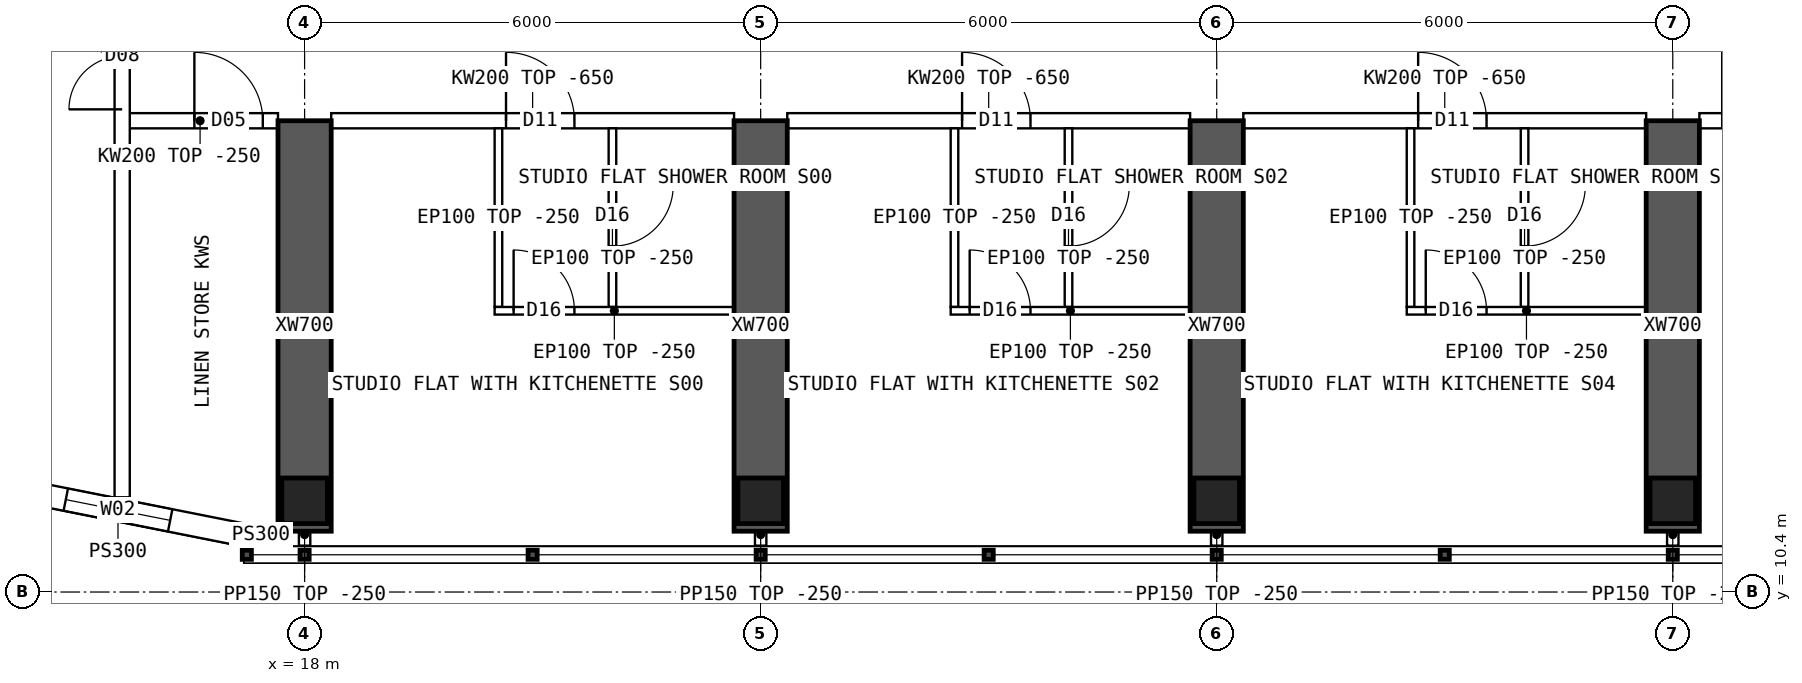
"""IFC4 building model, lengths in metres.
Left out: names, types, materials, properties, quantities, classifications, styles, units other than length and angle.
Written with IfcOpenShell. Run it as: python <this file> out.ifc"""

import sys

from ifc_helpers import new_model, si_unit, direction, frame, frame_2d, origin, origin_2d, place, context, subcontext, project, spatial, polyline, rectangle, hollow_rectangle, outline, extrude, element, fill, save


model = new_model("IFC4")
c1 = context("Model", 3, precision=1e-05, world=origin(), true_north=direction((0.0, 1.0)))
c2 = subcontext(c1, "Body", "Model", "MODEL_VIEW")
j1 = project(units=[si_unit("LENGTHUNIT", "METRE"), si_unit("PLANEANGLEUNIT", "RADIAN")], contexts=[c1])
p1 = place(None, origin())
s1 = spatial("IfcSite", under=j1, at=p1, CompositionType="ELEMENT")
p2 = place(p1, origin())
s2 = spatial("IfcBuilding", under=s1, at=p2, CompositionType="ELEMENT")
p3 = place(p2, frame((0.0, 0.0, 250.3)))
s3 = spatial("IfcBuildingStorey", under=s2, at=p3, CompositionType="ELEMENT", Elevation=250.3)
for number, where, z_axis, x_axis in (
    (1, (18.0, 11.6, 0.0), (0.0, 0.0, 1.0), (1.0, 0.0, 0.0)),
    (2, (24.0, 11.6, 0.0), (0.0, 0.0, 1.0), (1.0, 0.0, 0.0)),
    (3, (30.0, 11.6, 0.0), (0.0, 0.0, 1.0), (1.0, 0.0, 0.0)),
    (4, (36.0, 11.6, 0.0), (0.0, 0.0, 1.0), (1.0, 0.0, 0.0)),
):
    element("IfcColumn", number, at=place(p3, frame(where, z_axis=z_axis, x_axis=x_axis)), inside=s3, PredefinedType="COLUMN", context=c2, shape_type="SweptSolid", body=[
        extrude(hollow_rectangle(XDim=0.6, YDim=0.6, WallThickness=0.06, at=origin_2d()), origin(), (0.0, 0.0, 1.0), 3.75),
    ])
for number, where, z_axis, x_axis in (
    (5, (18.0, 11.2, 0.0), (0.0, 0.0, 1.0), (0.0, 1.0, 0.0)),
    (6, (24.0, 11.2, 0.0), (0.0, 0.0, 1.0), (0.0, 1.0, 0.0)),
    (7, (30.0, 11.2, 0.0), (0.0, 0.0, 1.0), (0.0, 1.0, 0.0)),
    (8, (36.0, 11.2, 0.0), (0.0, 0.0, 1.0), (0.0, 1.0, 0.0)),
):
    element("IfcWall", number, at=place(p3, frame(where, z_axis=z_axis, x_axis=x_axis)), inside=s3, PredefinedType="SHEAR", context=c2, shape_type="SweptSolid", body=[
        extrude(rectangle(XDim=5.4, YDim=0.7, at=frame_2d((2.7, 0.0))), origin(), (0.0, 0.0, 1.0), 3.75),
    ])
p4 = place(p3, frame((13.89, 11.808, 0.0), z_axis=(0.0, 0.0, 1.0), x_axis=(0.98078325777, -0.195100490205, 0.0)))
e9 = element("IfcWall", 9, at=p4, inside=s3, PredefinedType="SOLIDWALL", context=c2, shape_type="SweptSolid", body=[
    extrude(outline(polyline([(-0.03, -0.15), (3.405, -0.15), (3.345, 0.15), (0.03, 0.15), (-0.03, -0.15)])), origin(), (0.0, 0.0, 1.0), 3.5),
])
p5 = place(p4, frame((0.988, 0.0, 0.9)))
e10 = element("IfcOpeningElement", 10, at=p5, cuts=e9, PredefinedType="OPENING", context=c2, shape_type="SweptSolid", body=[
    extrude(rectangle(XDim=1.4, YDim=1.8, at=frame_2d((0.7, 0.9))), frame((0.0, 0.16, 0.0), z_axis=(0.0, -1.0, 0.0), x_axis=(1.0, 0.0, 0.0)), (0.0, 0.0, 1.0), 0.32),
])
p6 = place(p3, frame((17.2, 11.15, 0.0), z_axis=(0.0, 0.0, 1.0), x_axis=(1.0, 0.0, 0.0)))
e11 = element("IfcWall", 11, at=p6, inside=s3, PredefinedType="SOLIDWALL", context=c2, shape_type="SweptSolid", body=[
    extrude(rectangle(XDim=0.45, YDim=0.3, at=frame_2d((0.225, 0.0))), origin(), (0.0, 0.0, 1.0), 3.5),
])
p7 = place(p3, frame((15.6, 16.6, 0.0), z_axis=(0.0, 0.0, 1.0), x_axis=(1.0, 0.0, 0.0)))
e12 = element("IfcWall", 12, at=p7, inside=s3, PredefinedType="SOLIDWALL", context=c2, shape_type="SweptSolid", body=[
    extrude(rectangle(XDim=2.05, YDim=0.2, at=frame_2d((1.025, 0.0))), origin(), (0.0, 0.0, 1.0), 3.5),
])
p8 = place(p7, frame((0.95, 0.0, 0.0)))
e13 = element("IfcOpeningElement", 13, at=p8, cuts=e12, PredefinedType="OPENING", context=c2, shape_type="SweptSolid", body=[
    extrude(rectangle(XDim=0.9, YDim=2.1, at=frame_2d((0.45, 1.05))), frame((0.0, 0.11, 0.0), z_axis=(0.0, -1.0, 0.0), x_axis=(1.0, 0.0, 0.0)), (0.0, 0.0, 1.0), 0.22),
])
p9 = place(p3, frame((18.35, 16.6, 0.0), z_axis=(0.0, 0.0, 1.0), x_axis=(1.0, 0.0, 0.0)))
e14 = element("IfcWall", 14, at=p9, inside=s3, PredefinedType="SOLIDWALL", context=c2, shape_type="SweptSolid", body=[
    extrude(outline(polyline([(0.0, 0.0), (5.3, 0.0), (5.3, 3.1), (0.0, 3.1), (0.0, 0.0)])), frame((0.0, 0.1, 0.0), z_axis=(0.0, -1.0, 0.0), x_axis=(1.0, 0.0, 0.0)), (0.0, 0.0, 1.0), 0.2),
])
p10 = place(p9, frame((2.3, 0.0, 0.0)))
e15 = element("IfcOpeningElement", 15, at=p10, cuts=e14, PredefinedType="OPENING", context=c2, shape_type="SweptSolid", body=[
    extrude(rectangle(XDim=0.9, YDim=2.1, at=frame_2d((0.45, 1.05))), frame((0.0, 0.11, 0.0), z_axis=(0.0, -1.0, 0.0), x_axis=(1.0, 0.0, 0.0)), (0.0, 0.0, 1.0), 0.22),
])
p11 = place(p3, frame((24.35, 16.6, 0.0), z_axis=(0.0, 0.0, 1.0), x_axis=(1.0, 0.0, 0.0)))
e16 = element("IfcWall", 16, at=p11, inside=s3, PredefinedType="SOLIDWALL", context=c2, shape_type="SweptSolid", body=[
    extrude(outline(polyline([(0.0, 0.0), (5.3, 0.0), (5.3, 3.1), (0.0, 3.1), (0.0, 0.0)])), frame((0.0, 0.1, 0.0), z_axis=(0.0, -1.0, 0.0), x_axis=(1.0, 0.0, 0.0)), (0.0, 0.0, 1.0), 0.2),
])
p12 = place(p11, frame((2.3, 0.0, 0.0)))
e17 = element("IfcOpeningElement", 17, at=p12, cuts=e16, PredefinedType="OPENING", context=c2, shape_type="SweptSolid", body=[
    extrude(rectangle(XDim=0.9, YDim=2.1, at=frame_2d((0.45, 1.05))), frame((0.0, 0.11, 0.0), z_axis=(0.0, -1.0, 0.0), x_axis=(1.0, 0.0, 0.0)), (0.0, 0.0, 1.0), 0.22),
])
p13 = place(p3, frame((30.35, 16.6, 0.0), z_axis=(0.0, 0.0, 1.0), x_axis=(1.0, 0.0, 0.0)))
e18 = element("IfcWall", 18, at=p13, inside=s3, PredefinedType="SOLIDWALL", context=c2, shape_type="SweptSolid", body=[
    extrude(outline(polyline([(0.0, 0.0), (5.3, 0.0), (5.3, 3.1), (0.0, 3.1), (0.0, 0.0)])), frame((0.0, 0.1, 0.0), z_axis=(0.0, -1.0, 0.0), x_axis=(1.0, 0.0, 0.0)), (0.0, 0.0, 1.0), 0.2),
])
p14 = place(p13, frame((2.3, 0.0, 0.0)))
e19 = element("IfcOpeningElement", 19, at=p14, cuts=e18, PredefinedType="OPENING", context=c2, shape_type="SweptSolid", body=[
    extrude(rectangle(XDim=0.9, YDim=2.1, at=frame_2d((0.45, 1.05))), frame((0.0, 0.11, 0.0), z_axis=(0.0, -1.0, 0.0), x_axis=(1.0, 0.0, 0.0)), (0.0, 0.0, 1.0), 0.22),
])
p15 = place(p3, frame((36.35, 16.6, 0.0), z_axis=(0.0, 0.0, 1.0), x_axis=(1.0, 0.0, 0.0)))
e20 = element("IfcWall", 20, at=p15, inside=s3, PredefinedType="SOLIDWALL", context=c2, shape_type="SweptSolid", body=[
    extrude(outline(polyline([(0.0, 0.0), (5.3, 0.0), (5.3, 3.1), (0.0, 3.1), (0.0, 0.0)])), frame((0.0, 0.1, 0.0), z_axis=(0.0, -1.0, 0.0), x_axis=(1.0, 0.0, 0.0)), (0.0, 0.0, 1.0), 0.2),
])
p16 = place(p15, frame((0.3, 0.0, 0.0)))
e21 = element("IfcOpeningElement", 21, at=p16, cuts=e20, PredefinedType="OPENING", context=c2, shape_type="SweptSolid", body=[
    extrude(rectangle(XDim=1.0, YDim=2.1, at=frame_2d((0.5, 1.05))), frame((0.0, 0.11, 0.0), z_axis=(0.0, -1.0, 0.0), x_axis=(1.0, 0.0, 0.0)), (0.0, 0.0, 1.0), 0.22),
])
p17 = place(p3, frame((23.65, 14.1, 0.0), z_axis=(0.0, 0.0, 1.0), x_axis=(-1.0, 0.0, 0.0)))
e22 = element("IfcWall", 22, at=p17, inside=s3, PredefinedType="PARTITIONING", context=c2, shape_type="SweptSolid", body=[
    extrude(rectangle(XDim=3.15, YDim=0.1, at=frame_2d((1.575, 0.0))), origin(), (0.0, 0.0, 1.0), 3.5),
])
p18 = place(p17, frame((2.1, 0.0, 0.0)))
e23 = element("IfcOpeningElement", 23, at=p18, cuts=e22, PredefinedType="OPENING", context=c2, shape_type="SweptSolid", body=[
    extrude(rectangle(XDim=0.8, YDim=2.1, at=frame_2d((0.4, 1.05))), frame((0.0, 0.06, 0.0), z_axis=(0.0, -1.0, 0.0), x_axis=(1.0, 0.0, 0.0)), (0.0, 0.0, 1.0), 0.12),
])
p19 = place(p3, frame((20.55, 14.15, 0.0), z_axis=(0.0, 0.0, 1.0), x_axis=(0.0, 1.0, 0.0)))
e24 = element("IfcWall", 24, at=p19, inside=s3, PredefinedType="PARTITIONING", context=c2, shape_type="SweptSolid", body=[
    extrude(outline(polyline([(0.0, 0.0), (2.35, 0.0), (2.35, 3.1), (2.302, 3.1), (2.3, 3.5), (0.0, 3.5), (0.0, 0.0)])), frame((0.0, 0.05, 0.0), z_axis=(0.0, -1.0, 0.0), x_axis=(1.0, 0.0, 0.0)), (0.0, 0.0, 1.0), 0.1),
])
p20 = place(p3, frame((22.05, 14.15, 0.0), z_axis=(0.0, 0.0, 1.0), x_axis=(0.0, 1.0, 0.0)))
e25 = element("IfcWall", 25, at=p20, inside=s3, PredefinedType="PARTITIONING", context=c2, shape_type="SweptSolid", body=[
    extrude(outline(polyline([(0.0, 0.0), (2.35, 0.0), (2.35, 3.1), (2.302, 3.1), (2.3, 3.5), (0.0, 3.5), (0.0, 0.0)])), frame((0.0, 0.05, 0.0), z_axis=(0.0, -1.0, 0.0), x_axis=(1.0, 0.0, 0.0)), (0.0, 0.0, 1.0), 0.1),
])
p21 = place(p20, frame((0.8, 0.0, 0.0)))
e26 = element("IfcOpeningElement", 26, at=p21, cuts=e25, PredefinedType="OPENING", context=c2, shape_type="SweptSolid", body=[
    extrude(rectangle(XDim=0.8, YDim=2.1, at=frame_2d((0.4, 1.05))), frame((0.0, 0.06, 0.0), z_axis=(0.0, -1.0, 0.0), x_axis=(1.0, 0.0, 0.0)), (0.0, 0.0, 1.0), 0.12),
])
p22 = place(p3, frame((29.65, 14.1, 0.0), z_axis=(0.0, 0.0, 1.0), x_axis=(-1.0, 0.0, 0.0)))
e27 = element("IfcWall", 27, at=p22, inside=s3, PredefinedType="PARTITIONING", context=c2, shape_type="SweptSolid", body=[
    extrude(rectangle(XDim=3.15, YDim=0.1, at=frame_2d((1.575, 0.0))), origin(), (0.0, 0.0, 1.0), 3.5),
])
p23 = place(p22, frame((2.1, 0.0, 0.0)))
e28 = element("IfcOpeningElement", 28, at=p23, cuts=e27, PredefinedType="OPENING", context=c2, shape_type="SweptSolid", body=[
    extrude(rectangle(XDim=0.8, YDim=2.1, at=frame_2d((0.4, 1.05))), frame((0.0, 0.06, 0.0), z_axis=(0.0, -1.0, 0.0), x_axis=(1.0, 0.0, 0.0)), (0.0, 0.0, 1.0), 0.12),
])
p24 = place(p3, frame((26.55, 14.15, 0.0), z_axis=(0.0, 0.0, 1.0), x_axis=(0.0, 1.0, 0.0)))
e29 = element("IfcWall", 29, at=p24, inside=s3, PredefinedType="PARTITIONING", context=c2, shape_type="SweptSolid", body=[
    extrude(outline(polyline([(0.0, 0.0), (2.35, 0.0), (2.35, 3.1), (2.302, 3.1), (2.3, 3.5), (0.0, 3.5), (0.0, 0.0)])), frame((0.0, 0.05, 0.0), z_axis=(0.0, -1.0, 0.0), x_axis=(1.0, 0.0, 0.0)), (0.0, 0.0, 1.0), 0.1),
])
p25 = place(p3, frame((28.05, 14.15, 0.0), z_axis=(0.0, 0.0, 1.0), x_axis=(0.0, 1.0, 0.0)))
e30 = element("IfcWall", 30, at=p25, inside=s3, PredefinedType="PARTITIONING", context=c2, shape_type="SweptSolid", body=[
    extrude(outline(polyline([(0.0, 0.0), (2.35, 0.0), (2.35, 3.1), (2.302, 3.1), (2.3, 3.5), (0.0, 3.5), (0.0, 0.0)])), frame((0.0, 0.05, 0.0), z_axis=(0.0, -1.0, 0.0), x_axis=(1.0, 0.0, 0.0)), (0.0, 0.0, 1.0), 0.1),
])
p26 = place(p25, frame((0.8, 0.0, 0.0)))
e31 = element("IfcOpeningElement", 31, at=p26, cuts=e30, PredefinedType="OPENING", context=c2, shape_type="SweptSolid", body=[
    extrude(rectangle(XDim=0.8, YDim=2.1, at=frame_2d((0.4, 1.05))), frame((0.0, 0.06, 0.0), z_axis=(0.0, -1.0, 0.0), x_axis=(1.0, 0.0, 0.0)), (0.0, 0.0, 1.0), 0.12),
])
p27 = place(p3, frame((35.65, 14.1, 0.0), z_axis=(0.0, 0.0, 1.0), x_axis=(-1.0, 0.0, 0.0)))
e32 = element("IfcWall", 32, at=p27, inside=s3, PredefinedType="PARTITIONING", context=c2, shape_type="SweptSolid", body=[
    extrude(rectangle(XDim=3.15, YDim=0.1, at=frame_2d((1.575, 0.0))), origin(), (0.0, 0.0, 1.0), 3.5),
])
p28 = place(p27, frame((2.1, 0.0, 0.0)))
e33 = element("IfcOpeningElement", 33, at=p28, cuts=e32, PredefinedType="OPENING", context=c2, shape_type="SweptSolid", body=[
    extrude(rectangle(XDim=0.8, YDim=2.1, at=frame_2d((0.4, 1.05))), frame((0.0, 0.06, 0.0), z_axis=(0.0, -1.0, 0.0), x_axis=(1.0, 0.0, 0.0)), (0.0, 0.0, 1.0), 0.12),
])
p29 = place(p3, frame((32.55, 14.15, 0.0), z_axis=(0.0, 0.0, 1.0), x_axis=(0.0, 1.0, 0.0)))
e34 = element("IfcWall", 34, at=p29, inside=s3, PredefinedType="PARTITIONING", context=c2, shape_type="SweptSolid", body=[
    extrude(outline(polyline([(0.0, 0.0), (2.35, 0.0), (2.35, 3.1), (2.302, 3.1), (2.3, 3.5), (0.0, 3.5), (0.0, 0.0)])), frame((0.0, 0.05, 0.0), z_axis=(0.0, -1.0, 0.0), x_axis=(1.0, 0.0, 0.0)), (0.0, 0.0, 1.0), 0.1),
])
p30 = place(p3, frame((34.05, 14.15, 0.0), z_axis=(0.0, 0.0, 1.0), x_axis=(0.0, 1.0, 0.0)))
e35 = element("IfcWall", 35, at=p30, inside=s3, PredefinedType="PARTITIONING", context=c2, shape_type="SweptSolid", body=[
    extrude(outline(polyline([(0.0, 0.0), (2.35, 0.0), (2.35, 3.1), (2.302, 3.1), (2.3, 3.5), (0.0, 3.5), (0.0, 0.0)])), frame((0.0, 0.05, 0.0), z_axis=(0.0, -1.0, 0.0), x_axis=(1.0, 0.0, 0.0)), (0.0, 0.0, 1.0), 0.1),
])
p31 = place(p30, frame((0.8, 0.0, 0.0)))
e36 = element("IfcOpeningElement", 36, at=p31, cuts=e35, PredefinedType="OPENING", context=c2, shape_type="SweptSolid", body=[
    extrude(rectangle(XDim=0.8, YDim=2.1, at=frame_2d((0.4, 1.05))), frame((0.0, 0.06, 0.0), z_axis=(0.0, -1.0, 0.0), x_axis=(1.0, 0.0, 0.0)), (0.0, 0.0, 1.0), 0.12),
])
p32 = place(p3, frame((15.6, 11.646, 0.0), z_axis=(0.0, 0.0, 1.0), x_axis=(0.0, 1.0, 0.0)))
e37 = element("IfcWall", 37, at=p32, inside=s3, PredefinedType="SOLIDWALL", context=c2, shape_type="SweptSolid", body=[
    extrude(rectangle(XDim=40.708, YDim=0.2, at=frame_2d((20.354, 0.0))), origin(), (0.0, 0.0, 1.0), 3.5),
])
p33 = place(p32, frame((5.104, 0.0, 0.0)))
e38 = element("IfcOpeningElement", 38, at=p33, cuts=e37, PredefinedType="OPENING", context=c2, shape_type="SweptSolid", body=[
    extrude(rectangle(XDim=1.4, YDim=2.1, at=frame_2d((0.7, 1.05))), frame((0.0, 0.11, 0.0), z_axis=(0.0, -1.0, 0.0), x_axis=(1.0, 0.0, 0.0)), (0.0, 0.0, 1.0), 0.22),
])
p34 = place(p32, frame((34.104, 0.0, 0.0)))
e39 = element("IfcOpeningElement", 39, at=p34, cuts=e37, PredefinedType="OPENING", context=c2, shape_type="SweptSolid", body=[
    extrude(rectangle(XDim=1.4, YDim=2.1, at=frame_2d((0.7, 1.05))), frame((0.0, 0.11, 0.0), z_axis=(0.0, -1.0, 0.0), x_axis=(1.0, 0.0, 0.0)), (0.0, 0.0, 1.0), 0.22),
])
for number, where, z_axis, x_axis in (
    (40, (18.0, 11.3, 0.0), (0.0, 0.0, 1.0), (0.0, -1.0, 0.0)),
    (41, (24.0, 11.3, 0.0), (0.0, 0.0, 1.0), (0.0, -1.0, 0.0)),
    (42, (30.0, 11.3, 0.0), (0.0, 0.0, 1.0), (0.0, -1.0, 0.0)),
    (43, (36.0, 11.3, 0.0), (0.0, 0.0, 1.0), (0.0, -1.0, 0.0)),
):
    element("IfcWall", number, at=place(p3, frame(where, z_axis=z_axis, x_axis=x_axis)), inside=s3, PredefinedType="PARTITIONING", context=c2, shape_type="SweptSolid", body=[
        extrude(rectangle(XDim=0.29, YDim=0.15, at=frame_2d((0.145, 0.0))), origin(), (0.0, 0.0, 1.0), 3.5),
    ])
p35 = place(p5, origin())
e44 = element("IfcWindow", 44, at=p35, inside=s3, PartitioningType="SINGLE_PANEL", PredefinedType="WINDOW", context=c2, shape_type="SweptSolid", body=[
    extrude(rectangle(XDim=1.4, YDim=1.8, at=frame_2d((0.7, 0.9))), frame((0.0, 0.03, 0.0), z_axis=(0.0, -1.0, 0.0), x_axis=(1.0, 0.0, 0.0)), (0.0, 0.0, 1.0), 0.06),
])
fill(e10, e44)
p36 = place(p18, origin())
e45 = element("IfcDoor", 45, at=p36, inside=s3, OperationType="SINGLE_SWING_RIGHT", PredefinedType="DOOR", context=c2, shape_type="SweptSolid", body=[
    extrude(rectangle(XDim=0.8, YDim=2.1, at=frame_2d((0.4, 1.05))), frame((0.0, 0.025, 0.0), z_axis=(0.0, -1.0, 0.0), x_axis=(1.0, 0.0, 0.0)), (0.0, 0.0, 1.0), 0.05),
])
fill(e23, e45)
p37 = place(p21, origin())
e46 = element("IfcDoor", 46, at=p37, inside=s3, OperationType="SINGLE_SWING_RIGHT", PredefinedType="DOOR", context=c2, shape_type="SweptSolid", body=[
    extrude(rectangle(XDim=0.8, YDim=2.1, at=frame_2d((0.4, 1.05))), frame((0.0, 0.025, 0.0), z_axis=(0.0, -1.0, 0.0), x_axis=(1.0, 0.0, 0.0)), (0.0, 0.0, 1.0), 0.05),
])
fill(e26, e46)
p38 = place(p10, origin())
e47 = element("IfcDoor", 47, at=p38, inside=s3, OperationType="SINGLE_SWING_LEFT", PredefinedType="DOOR", context=c2, shape_type="SweptSolid", body=[
    extrude(rectangle(XDim=0.9, YDim=2.1, at=frame_2d((0.45, 1.05))), frame((0.0, 0.025, 0.0), z_axis=(0.0, -1.0, 0.0), x_axis=(1.0, 0.0, 0.0)), (0.0, 0.0, 1.0), 0.05),
])
fill(e15, e47)
p39 = place(p23, origin())
e48 = element("IfcDoor", 48, at=p39, inside=s3, OperationType="SINGLE_SWING_RIGHT", PredefinedType="DOOR", context=c2, shape_type="SweptSolid", body=[
    extrude(rectangle(XDim=0.8, YDim=2.1, at=frame_2d((0.4, 1.05))), frame((0.0, 0.025, 0.0), z_axis=(0.0, -1.0, 0.0), x_axis=(1.0, 0.0, 0.0)), (0.0, 0.0, 1.0), 0.05),
])
fill(e28, e48)
p40 = place(p26, origin())
e49 = element("IfcDoor", 49, at=p40, inside=s3, OperationType="SINGLE_SWING_RIGHT", PredefinedType="DOOR", context=c2, shape_type="SweptSolid", body=[
    extrude(rectangle(XDim=0.8, YDim=2.1, at=frame_2d((0.4, 1.05))), frame((0.0, 0.025, 0.0), z_axis=(0.0, -1.0, 0.0), x_axis=(1.0, 0.0, 0.0)), (0.0, 0.0, 1.0), 0.05),
])
fill(e31, e49)
p41 = place(p12, origin())
e50 = element("IfcDoor", 50, at=p41, inside=s3, OperationType="SINGLE_SWING_LEFT", PredefinedType="DOOR", context=c2, shape_type="SweptSolid", body=[
    extrude(rectangle(XDim=0.9, YDim=2.1, at=frame_2d((0.45, 1.05))), frame((0.0, 0.025, 0.0), z_axis=(0.0, -1.0, 0.0), x_axis=(1.0, 0.0, 0.0)), (0.0, 0.0, 1.0), 0.05),
])
fill(e17, e50)
p42 = place(p28, origin())
e51 = element("IfcDoor", 51, at=p42, inside=s3, OperationType="SINGLE_SWING_RIGHT", PredefinedType="DOOR", context=c2, shape_type="SweptSolid", body=[
    extrude(rectangle(XDim=0.8, YDim=2.1, at=frame_2d((0.4, 1.05))), frame((0.0, 0.025, 0.0), z_axis=(0.0, -1.0, 0.0), x_axis=(1.0, 0.0, 0.0)), (0.0, 0.0, 1.0), 0.05),
])
fill(e33, e51)
p43 = place(p31, origin())
e52 = element("IfcDoor", 52, at=p43, inside=s3, OperationType="SINGLE_SWING_RIGHT", PredefinedType="DOOR", context=c2, shape_type="SweptSolid", body=[
    extrude(rectangle(XDim=0.8, YDim=2.1, at=frame_2d((0.4, 1.05))), frame((0.0, 0.025, 0.0), z_axis=(0.0, -1.0, 0.0), x_axis=(1.0, 0.0, 0.0)), (0.0, 0.0, 1.0), 0.05),
])
fill(e36, e52)
p44 = place(p14, origin())
e53 = element("IfcDoor", 53, at=p44, inside=s3, OperationType="SINGLE_SWING_LEFT", PredefinedType="DOOR", context=c2, shape_type="SweptSolid", body=[
    extrude(rectangle(XDim=0.9, YDim=2.1, at=frame_2d((0.45, 1.05))), frame((0.0, 0.025, 0.0), z_axis=(0.0, -1.0, 0.0), x_axis=(1.0, 0.0, 0.0)), (0.0, 0.0, 1.0), 0.05),
])
fill(e19, e53)
p45 = place(p33, origin())
e54 = element("IfcDoor", 54, at=p45, inside=s3, OperationType="DOUBLE_DOOR_SINGLE_SWING", PredefinedType="DOOR", context=c2, shape_type="SweptSolid", body=[
    extrude(rectangle(XDim=1.4, YDim=2.1, at=frame_2d((0.7, 1.05))), frame((0.0, 0.025, 0.0), z_axis=(0.0, -1.0, 0.0), x_axis=(1.0, 0.0, 0.0)), (0.0, 0.0, 1.0), 0.05),
])
fill(e38, e54)
p46 = place(p8, origin())
e55 = element("IfcDoor", 55, at=p46, inside=s3, OperationType="SINGLE_SWING_LEFT", PredefinedType="DOOR", context=c2, shape_type="SweptSolid", body=[
    extrude(rectangle(XDim=0.9, YDim=2.1, at=frame_2d((0.45, 1.05))), frame((0.0, 0.025, 0.0), z_axis=(0.0, -1.0, 0.0), x_axis=(1.0, 0.0, 0.0)), (0.0, 0.0, 1.0), 0.05),
])
fill(e13, e55)
save(model, sys.argv[1])
